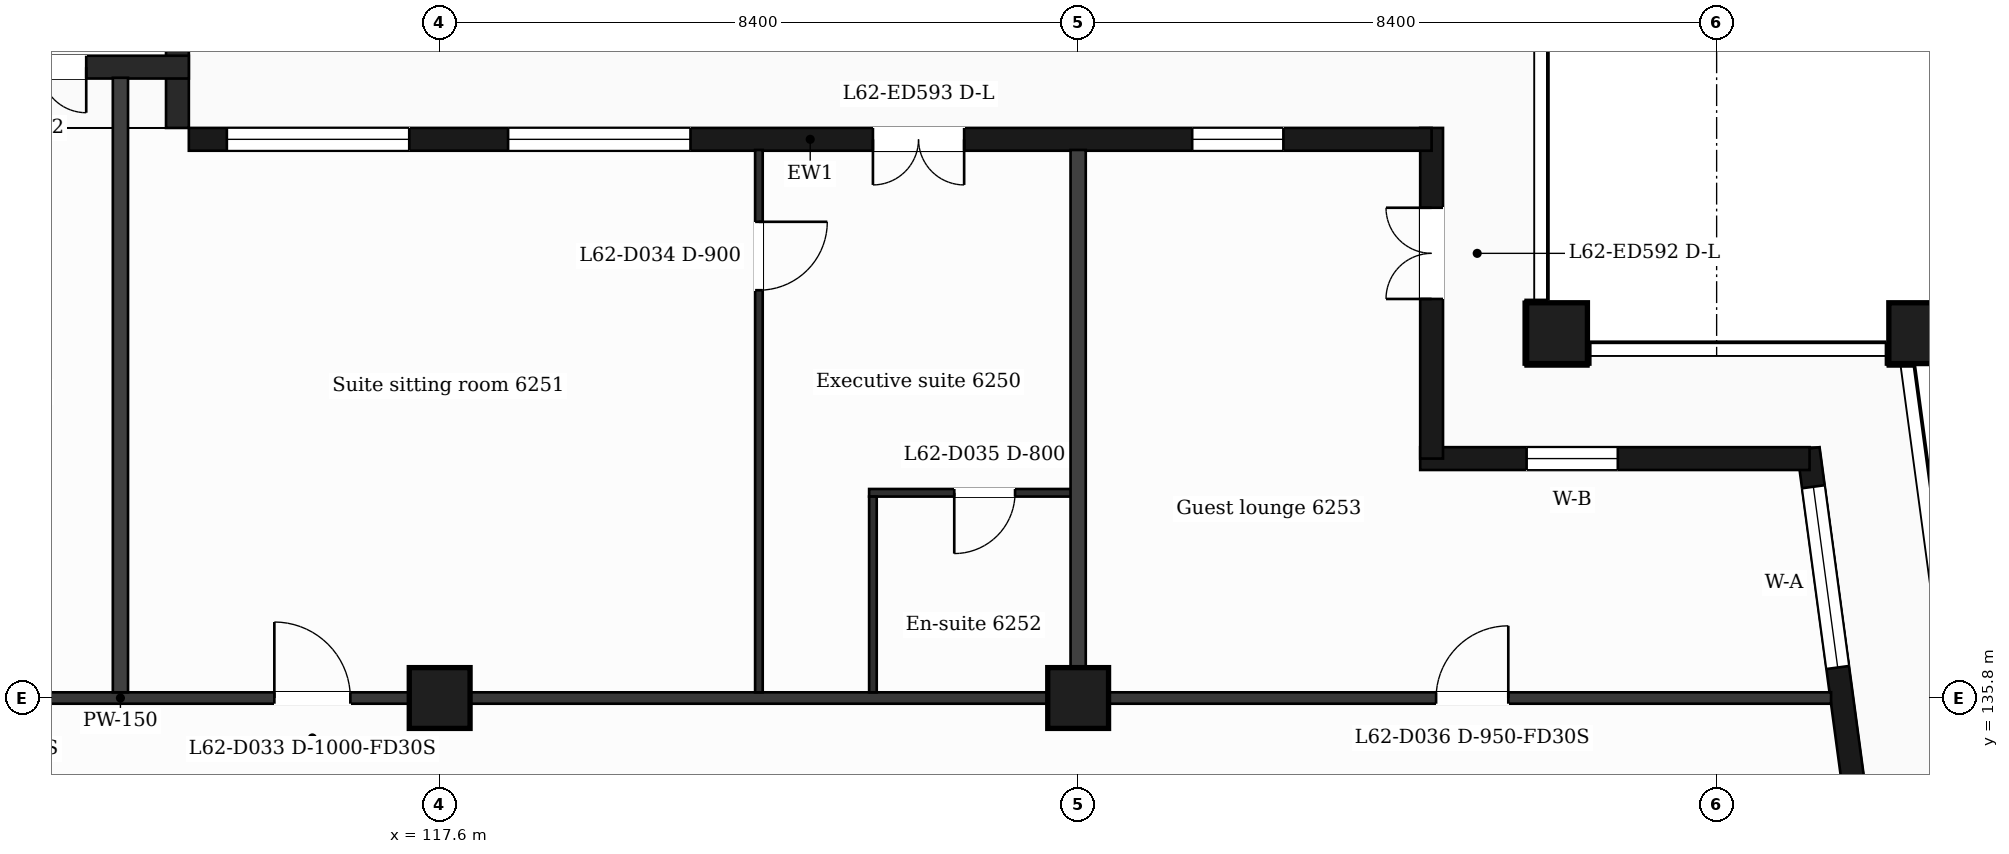
"""IFC4 building model, lengths in metres.
Left out: names, types, materials, properties, quantities, classifications, styles, units other than length and angle.
Written with IfcOpenShell. Run it as: python <this file> out.ifc"""

import sys

from ifc_helpers import new_model, si_unit, direction, frame, frame_2d, origin, origin_2d, place, context, subcontext, project, spatial, rectangle, extrude, element, fill, save


model = new_model("IFC4")
c1 = context("Model", 3, precision=1e-05, world=origin(), true_north=direction((0.0, 1.0)))
c2 = subcontext(c1, "Body", "Model", "MODEL_VIEW")
j1 = project(units=[si_unit("LENGTHUNIT", "METRE"), si_unit("PLANEANGLEUNIT", "RADIAN")], contexts=[c1])
p1 = place(None, origin())
s1 = spatial("IfcSite", under=j1, at=p1, CompositionType="ELEMENT")
p2 = place(p1, origin())
s2 = spatial("IfcBuilding", under=s1, at=p2, CompositionType="ELEMENT")
p3 = place(p2, frame((0.0, 0.0, 259.0)))
s3 = spatial("IfcBuildingStorey", under=s2, at=p3, CompositionType="ELEMENT", Elevation=259.0)
for number, where, z_axis, x_axis in (
    (1, (132.3, 140.6, 0.0), (0.0, 0.0, 1.0), (1.0, 0.0, 0.0)),
    (2, (137.065, 140.6, 0.0), (0.0, 0.0, 1.0), (1.0, 0.0, 0.0)),
    (3, (117.6, 135.8, 0.0), (0.0, 0.0, 1.0), (1.0, 0.0, 0.0)),
    (4, (126.0, 135.8, 0.0), (0.0, 0.0, 1.0), (1.0, 0.0, 0.0)),
):
    element("IfcColumn", number, at=place(p3, frame(where, z_axis=z_axis, x_axis=x_axis)), inside=s3, PredefinedType="COLUMN", context=c2, shape_type="SweptSolid", body=[
        extrude(rectangle(XDim=0.8, YDim=0.8, at=origin_2d()), origin(), (0.0, 0.0, 1.0), 3.7),
    ])
p4 = place(p3, frame((136.504, 132.4, 0.0), z_axis=(0.0, 0.0, 1.0), x_axis=(-0.133399697462, 0.99106231929, 0.0)))
e5 = element("IfcWall", 5, at=p4, inside=s3, PredefinedType="SOLIDWALL", context=c2, shape_type="SweptSolid", body=[
    extrude(rectangle(XDim=6.74, YDim=0.3, at=frame_2d((3.37, 0.0))), origin(), (0.0, 0.0, 1.0), 3.38),
])
p5 = place(p4, frame((1.115, 0.0, 0.0)))
e6 = element("IfcOpeningElement", 6, at=p5, cuts=e5, PredefinedType="OPENING", context=c2, shape_type="SweptSolid", body=[
    extrude(rectangle(XDim=1.2, YDim=2.4, at=frame_2d((0.6, 1.2))), frame((0.0, 0.16, 0.0), z_axis=(0.0, -1.0, 0.0), x_axis=(1.0, 0.0, 0.0)), (0.0, 0.0, 1.0), 0.32),
])
p6 = place(p4, frame((3.835, 0.0, 0.9)))
e7 = element("IfcOpeningElement", 7, at=p6, cuts=e5, PredefinedType="OPENING", context=c2, shape_type="SweptSolid", body=[
    extrude(rectangle(XDim=2.4, YDim=2.1, at=frame_2d((1.2, 1.05))), frame((0.0, 0.16, 0.0), z_axis=(0.0, -1.0, 0.0), x_axis=(1.0, 0.0, 0.0)), (0.0, 0.0, 1.0), 0.32),
])
p7 = place(p3, frame((135.623, 138.95, 0.0), z_axis=(0.0, 0.0, 1.0), x_axis=(-1.0, 0.0, 0.0)))
e8 = element("IfcWall", 8, at=p7, inside=s3, PredefinedType="SOLIDWALL", context=c2, shape_type="SweptSolid", body=[
    extrude(rectangle(XDim=5.123, YDim=0.3, at=frame_2d((2.561, 0.0))), origin(), (0.0, 0.0, 1.0), 3.38),
])
p8 = place(p7, frame((2.523, 0.0, 0.9)))
e9 = element("IfcOpeningElement", 9, at=p8, cuts=e8, PredefinedType="OPENING", context=c2, shape_type="SweptSolid", body=[
    extrude(rectangle(XDim=1.2, YDim=2.1, at=frame_2d((0.6, 1.05))), frame((0.0, 0.16, 0.0), z_axis=(0.0, -1.0, 0.0), x_axis=(1.0, 0.0, 0.0)), (0.0, 0.0, 1.0), 0.32),
])
p9 = place(p3, frame((130.65, 138.95, 0.0), z_axis=(0.0, 0.0, 1.0), x_axis=(0.0, 1.0, 0.0)))
e10 = element("IfcWall", 10, at=p9, inside=s3, PredefinedType="SOLIDWALL", context=c2, shape_type="SweptSolid", body=[
    extrude(rectangle(XDim=4.35, YDim=0.3, at=frame_2d((2.175, 0.0))), origin(), (0.0, 0.0, 1.0), 3.38),
])
p10 = place(p9, frame((2.1, 0.0, 0.0)))
e11 = element("IfcOpeningElement", 11, at=p10, cuts=e10, PredefinedType="OPENING", context=c2, shape_type="SweptSolid", body=[
    extrude(rectangle(XDim=1.2, YDim=2.4, at=frame_2d((0.6, 1.2))), frame((0.0, 0.16, 0.0), z_axis=(0.0, -1.0, 0.0), x_axis=(1.0, 0.0, 0.0)), (0.0, 0.0, 1.0), 0.32),
])
p11 = place(p3, frame((130.65, 143.15, 0.0), z_axis=(0.0, 0.0, 1.0), x_axis=(-1.0, 0.0, 0.0)))
e12 = element("IfcWall", 12, at=p11, inside=s3, PredefinedType="SOLIDWALL", context=c2, shape_type="SweptSolid", body=[
    extrude(rectangle(XDim=16.35, YDim=0.3, at=frame_2d((8.175, 0.0))), origin(), (0.0, 0.0, 1.0), 3.38),
])
p12 = place(p11, frame((1.95, 0.0, 0.9)))
e13 = element("IfcOpeningElement", 13, at=p12, cuts=e12, PredefinedType="OPENING", context=c2, shape_type="SweptSolid", body=[
    extrude(rectangle(XDim=1.2, YDim=2.1, at=frame_2d((0.6, 1.05))), frame((0.0, 0.16, 0.0), z_axis=(0.0, -1.0, 0.0), x_axis=(1.0, 0.0, 0.0)), (0.0, 0.0, 1.0), 0.32),
])
p13 = place(p11, frame((6.15, 0.0, 0.0)))
e14 = element("IfcOpeningElement", 14, at=p13, cuts=e12, PredefinedType="OPENING", context=c2, shape_type="SweptSolid", body=[
    extrude(rectangle(XDim=1.2, YDim=2.4, at=frame_2d((0.6, 1.2))), frame((0.0, 0.16, 0.0), z_axis=(0.0, -1.0, 0.0), x_axis=(1.0, 0.0, 0.0)), (0.0, 0.0, 1.0), 0.32),
])
p14 = place(p11, frame((9.75, 0.0, 0.9)))
e15 = element("IfcOpeningElement", 15, at=p14, cuts=e12, PredefinedType="OPENING", context=c2, shape_type="SweptSolid", body=[
    extrude(rectangle(XDim=2.4, YDim=2.1, at=frame_2d((1.2, 1.05))), frame((0.0, 0.16, 0.0), z_axis=(0.0, -1.0, 0.0), x_axis=(1.0, 0.0, 0.0)), (0.0, 0.0, 1.0), 0.32),
])
p15 = place(p11, frame((13.45, 0.0, 0.9)))
e16 = element("IfcOpeningElement", 16, at=p15, cuts=e12, PredefinedType="OPENING", context=c2, shape_type="SweptSolid", body=[
    extrude(rectangle(XDim=2.4, YDim=2.1, at=frame_2d((1.2, 1.05))), frame((0.0, 0.16, 0.0), z_axis=(0.0, -1.0, 0.0), x_axis=(1.0, 0.0, 0.0)), (0.0, 0.0, 1.0), 0.32),
])
p16 = place(p3, frame((114.15, 143.3, 0.0), z_axis=(0.0, 0.0, 1.0), x_axis=(0.0, 1.0, 0.0)))
e17 = element("IfcWall", 17, at=p16, inside=s3, PredefinedType="SOLIDWALL", context=c2, shape_type="SweptSolid", body=[
    extrude(rectangle(XDim=1.35, YDim=0.3, at=frame_2d((0.675, 0.0))), origin(), (0.0, 0.0, 1.0), 3.38),
])
p17 = place(p3, frame((114.3, 144.1, 0.0), z_axis=(0.0, 0.0, 1.0), x_axis=(-1.0, 0.0, 0.0)))
e18 = element("IfcWall", 18, at=p17, inside=s3, PredefinedType="SOLIDWALL", context=c2, shape_type="SweptSolid", body=[
    extrude(rectangle(XDim=3.9, YDim=0.3, at=frame_2d((1.95, 0.0))), origin(), (0.0, 0.0, 1.0), 3.38),
])
p18 = place(p17, frame((1.35, 0.0, 0.0)))
e19 = element("IfcOpeningElement", 19, at=p18, cuts=e18, PredefinedType="OPENING", context=c2, shape_type="SweptSolid", body=[
    extrude(rectangle(XDim=1.2, YDim=2.4, at=frame_2d((0.6, 1.2))), frame((0.0, 0.16, 0.0), z_axis=(0.0, -1.0, 0.0), x_axis=(1.0, 0.0, 0.0)), (0.0, 0.0, 1.0), 0.32),
])
p19 = place(p3, frame((90.895, 135.8, 0.0), z_axis=(0.0, 0.0, 1.0), x_axis=(1.0, 0.0, 0.0)))
e20 = element("IfcWall", 20, at=p19, inside=s3, PredefinedType="PARTITIONING", context=c2, shape_type="SweptSolid", body=[
    extrude(rectangle(XDim=45.011, YDim=0.15, at=frame_2d((22.505, 0.0))), origin(), (0.0, 0.0, 1.0), 3.38),
])
p20 = place(p19, frame((7.455, 0.0, 0.0)))
e21 = element("IfcOpeningElement", 21, at=p20, cuts=e20, PredefinedType="OPENING", context=c2, shape_type="SweptSolid", body=[
    extrude(rectangle(XDim=1.0, YDim=2.1, at=frame_2d((0.5, 1.05))), frame((0.0, 0.085, 0.0), z_axis=(0.0, -1.0, 0.0), x_axis=(1.0, 0.0, 0.0)), (0.0, 0.0, 1.0), 0.17),
])
p21 = place(p19, frame((11.505, 0.0, 0.0)))
e22 = element("IfcOpeningElement", 22, at=p21, cuts=e20, PredefinedType="OPENING", context=c2, shape_type="SweptSolid", body=[
    extrude(rectangle(XDim=1.0, YDim=2.1, at=frame_2d((0.5, 1.05))), frame((0.0, 0.085, 0.0), z_axis=(0.0, -1.0, 0.0), x_axis=(1.0, 0.0, 0.0)), (0.0, 0.0, 1.0), 0.17),
])
p22 = place(p19, frame((19.675, 0.0, 0.0)))
e23 = element("IfcOpeningElement", 23, at=p22, cuts=e20, PredefinedType="OPENING", context=c2, shape_type="SweptSolid", body=[
    extrude(rectangle(XDim=0.95, YDim=2.1, at=frame_2d((0.475, 1.05))), frame((0.0, 0.085, 0.0), z_axis=(0.0, -1.0, 0.0), x_axis=(1.0, 0.0, 0.0)), (0.0, 0.0, 1.0), 0.17),
])
p23 = place(p19, frame((24.531, 0.0, 0.0)))
e24 = element("IfcOpeningElement", 24, at=p23, cuts=e20, PredefinedType="OPENING", context=c2, shape_type="SweptSolid", body=[
    extrude(rectangle(XDim=1.0, YDim=2.1, at=frame_2d((0.5, 1.05))), frame((0.0, 0.085, 0.0), z_axis=(0.0, -1.0, 0.0), x_axis=(1.0, 0.0, 0.0)), (0.0, 0.0, 1.0), 0.17),
])
p24 = place(p19, frame((39.814, 0.0, 0.0)))
e25 = element("IfcOpeningElement", 25, at=p24, cuts=e20, PredefinedType="OPENING", context=c2, shape_type="SweptSolid", body=[
    extrude(rectangle(XDim=0.95, YDim=2.1, at=frame_2d((0.475, 1.05))), frame((0.0, 0.085, 0.0), z_axis=(0.0, -1.0, 0.0), x_axis=(1.0, 0.0, 0.0)), (0.0, 0.0, 1.0), 0.17),
])
p25 = place(p3, frame((123.25, 138.5, 0.0), z_axis=(0.0, 0.0, 1.0), x_axis=(1.0, 0.0, 0.0)))
e26 = element("IfcWall", 26, at=p25, inside=s3, PredefinedType="PARTITIONING", context=c2, shape_type="SweptSolid", body=[
    extrude(rectangle(XDim=2.75, YDim=0.1, at=frame_2d((1.375, 0.0))), origin(), (0.0, 0.0, 1.0), 3.38),
])
p26 = place(p25, frame((1.12, 0.0, 0.0)))
e27 = element("IfcOpeningElement", 27, at=p26, cuts=e26, PredefinedType="OPENING", context=c2, shape_type="SweptSolid", body=[
    extrude(rectangle(XDim=0.8, YDim=2.1, at=frame_2d((0.4, 1.05))), frame((0.0, 0.06, 0.0), z_axis=(0.0, -1.0, 0.0), x_axis=(1.0, 0.0, 0.0)), (0.0, 0.0, 1.0), 0.12),
])
p27 = place(p3, frame((113.4, 135.875, 0.0), z_axis=(0.0, 0.0, 1.0), x_axis=(0.0, 1.0, 0.0)))
e28 = element("IfcWall", 28, at=p27, inside=s3, PredefinedType="PARTITIONING", context=c2, shape_type="SweptSolid", body=[
    extrude(rectangle(XDim=8.085, YDim=0.2, at=frame_2d((4.042, 0.0))), origin(), (0.0, 0.0, 1.0), 3.38),
])
p28 = place(p3, frame((121.8, 135.875, 0.0), z_axis=(0.0, 0.0, 1.0), x_axis=(0.0, 1.0, 0.0)))
e29 = element("IfcWall", 29, at=p28, inside=s3, PredefinedType="PARTITIONING", context=c2, shape_type="SweptSolid", body=[
    extrude(rectangle(XDim=7.135, YDim=0.1, at=frame_2d((3.567, 0.0))), origin(), (0.0, 0.0, 1.0), 3.38),
])
p29 = place(p28, frame((5.29, 0.0, 0.0)))
e30 = element("IfcOpeningElement", 30, at=p29, cuts=e29, PredefinedType="OPENING", context=c2, shape_type="SweptSolid", body=[
    extrude(rectangle(XDim=0.9, YDim=2.1, at=frame_2d((0.45, 1.05))), frame((0.0, 0.06, 0.0), z_axis=(0.0, -1.0, 0.0), x_axis=(1.0, 0.0, 0.0)), (0.0, 0.0, 1.0), 0.12),
])
p30 = place(p3, frame((123.3, 135.875, 0.0), z_axis=(0.0, 0.0, 1.0), x_axis=(0.0, 1.0, 0.0)))
e31 = element("IfcWall", 31, at=p30, inside=s3, PredefinedType="PARTITIONING", context=c2, shape_type="SweptSolid", body=[
    extrude(rectangle(XDim=2.575, YDim=0.1, at=frame_2d((1.288, 0.0))), origin(), (0.0, 0.0, 1.0), 3.38),
])
p31 = place(p3, frame((126.0, 135.875, 0.0), z_axis=(0.0, 0.0, 1.0), x_axis=(0.0, 1.0, 0.0)))
e32 = element("IfcWall", 32, at=p31, inside=s3, PredefinedType="PARTITIONING", context=c2, shape_type="SweptSolid", body=[
    extrude(rectangle(XDim=7.135, YDim=0.2, at=frame_2d((3.567, 0.0))), origin(), (0.0, 0.0, 1.0), 3.38),
])
p32 = place(p6, origin())
e33 = element("IfcWindow", 33, at=p32, inside=s3, PartitioningType="SINGLE_PANEL", PredefinedType="WINDOW", context=c2, shape_type="SweptSolid", body=[
    extrude(rectangle(XDim=2.4, YDim=2.1, at=frame_2d((1.2, 1.05))), frame((0.0, 0.03, 0.0), z_axis=(0.0, -1.0, 0.0), x_axis=(1.0, 0.0, 0.0)), (0.0, 0.0, 1.0), 0.06),
])
fill(e7, e33)
p33 = place(p8, origin())
e34 = element("IfcWindow", 34, at=p33, inside=s3, PartitioningType="SINGLE_PANEL", PredefinedType="WINDOW", context=c2, shape_type="SweptSolid", body=[
    extrude(rectangle(XDim=1.2, YDim=2.1, at=frame_2d((0.6, 1.05))), frame((0.0, 0.03, 0.0), z_axis=(0.0, -1.0, 0.0), x_axis=(1.0, 0.0, 0.0)), (0.0, 0.0, 1.0), 0.06),
])
fill(e9, e34)
p34 = place(p10, origin())
e35 = element("IfcDoor", 35, at=p34, inside=s3, OperationType="DOUBLE_DOOR_SINGLE_SWING", PredefinedType="DOOR", context=c2, shape_type="SweptSolid", body=[
    extrude(rectangle(XDim=1.2, YDim=2.4, at=frame_2d((0.6, 1.2))), frame((0.0, 0.025, 0.0), z_axis=(0.0, -1.0, 0.0), x_axis=(1.0, 0.0, 0.0)), (0.0, 0.0, 1.0), 0.05),
])
fill(e11, e35)
p35 = place(p12, origin())
e36 = element("IfcWindow", 36, at=p35, inside=s3, PartitioningType="SINGLE_PANEL", PredefinedType="WINDOW", context=c2, shape_type="SweptSolid", body=[
    extrude(rectangle(XDim=1.2, YDim=2.1, at=frame_2d((0.6, 1.05))), frame((0.0, 0.03, 0.0), z_axis=(0.0, -1.0, 0.0), x_axis=(1.0, 0.0, 0.0)), (0.0, 0.0, 1.0), 0.06),
])
fill(e13, e36)
p36 = place(p13, origin())
e37 = element("IfcDoor", 37, at=p36, inside=s3, OperationType="DOUBLE_DOOR_SINGLE_SWING", PredefinedType="DOOR", context=c2, shape_type="SweptSolid", body=[
    extrude(rectangle(XDim=1.2, YDim=2.4, at=frame_2d((0.6, 1.2))), frame((0.0, 0.025, 0.0), z_axis=(0.0, -1.0, 0.0), x_axis=(1.0, 0.0, 0.0)), (0.0, 0.0, 1.0), 0.05),
])
fill(e14, e37)
p37 = place(p14, origin())
e38 = element("IfcWindow", 38, at=p37, inside=s3, PartitioningType="SINGLE_PANEL", PredefinedType="WINDOW", context=c2, shape_type="SweptSolid", body=[
    extrude(rectangle(XDim=2.4, YDim=2.1, at=frame_2d((1.2, 1.05))), frame((0.0, 0.03, 0.0), z_axis=(0.0, -1.0, 0.0), x_axis=(1.0, 0.0, 0.0)), (0.0, 0.0, 1.0), 0.06),
])
fill(e15, e38)
p38 = place(p15, origin())
e39 = element("IfcWindow", 39, at=p38, inside=s3, PartitioningType="SINGLE_PANEL", PredefinedType="WINDOW", context=c2, shape_type="SweptSolid", body=[
    extrude(rectangle(XDim=2.4, YDim=2.1, at=frame_2d((1.2, 1.05))), frame((0.0, 0.03, 0.0), z_axis=(0.0, -1.0, 0.0), x_axis=(1.0, 0.0, 0.0)), (0.0, 0.0, 1.0), 0.06),
])
fill(e16, e39)
p39 = place(p18, origin())
e40 = element("IfcDoor", 40, at=p39, inside=s3, OperationType="DOUBLE_DOOR_SINGLE_SWING", PredefinedType="DOOR", context=c2, shape_type="SweptSolid", body=[
    extrude(rectangle(XDim=1.2, YDim=2.4, at=frame_2d((0.6, 1.2))), frame((0.0, 0.025, 0.0), z_axis=(0.0, -1.0, 0.0), x_axis=(1.0, 0.0, 0.0)), (0.0, 0.0, 1.0), 0.05),
])
fill(e19, e40)
p40 = place(p23, origin())
e41 = element("IfcDoor", 41, at=p40, inside=s3, OperationType="SINGLE_SWING_LEFT", PredefinedType="DOOR", context=c2, shape_type="SweptSolid", body=[
    extrude(rectangle(XDim=1.0, YDim=2.1, at=frame_2d((0.5, 1.05))), frame((0.0, 0.025, 0.0), z_axis=(0.0, -1.0, 0.0), x_axis=(1.0, 0.0, 0.0)), (0.0, 0.0, 1.0), 0.05),
])
fill(e24, e41)
p41 = place(p29, origin())
e42 = element("IfcDoor", 42, at=p41, inside=s3, OperationType="SINGLE_SWING_RIGHT", PredefinedType="DOOR", context=c2, shape_type="SweptSolid", body=[
    extrude(rectangle(XDim=0.9, YDim=2.1, at=frame_2d((0.45, 1.05))), frame((0.0, 0.025, 0.0), z_axis=(0.0, -1.0, 0.0), x_axis=(1.0, 0.0, 0.0)), (0.0, 0.0, 1.0), 0.05),
])
fill(e30, e42)
p42 = place(p26, origin())
e43 = element("IfcDoor", 43, at=p42, inside=s3, OperationType="SINGLE_SWING_LEFT", PredefinedType="DOOR", context=c2, shape_type="SweptSolid", body=[
    extrude(rectangle(XDim=0.8, YDim=2.1, at=frame_2d((0.4, 1.05))), frame((0.0, 0.025, 0.0), z_axis=(0.0, -1.0, 0.0), x_axis=(1.0, 0.0, 0.0)), (0.0, 0.0, 1.0), 0.05),
])
fill(e27, e43)
p43 = place(p24, origin())
e44 = element("IfcDoor", 44, at=p43, inside=s3, OperationType="SINGLE_SWING_RIGHT", PredefinedType="DOOR", context=c2, shape_type="SweptSolid", body=[
    extrude(rectangle(XDim=0.95, YDim=2.1, at=frame_2d((0.475, 1.05))), frame((0.0, 0.025, 0.0), z_axis=(0.0, -1.0, 0.0), x_axis=(1.0, 0.0, 0.0)), (0.0, 0.0, 1.0), 0.05),
])
fill(e25, e44)
save(model, sys.argv[1])
